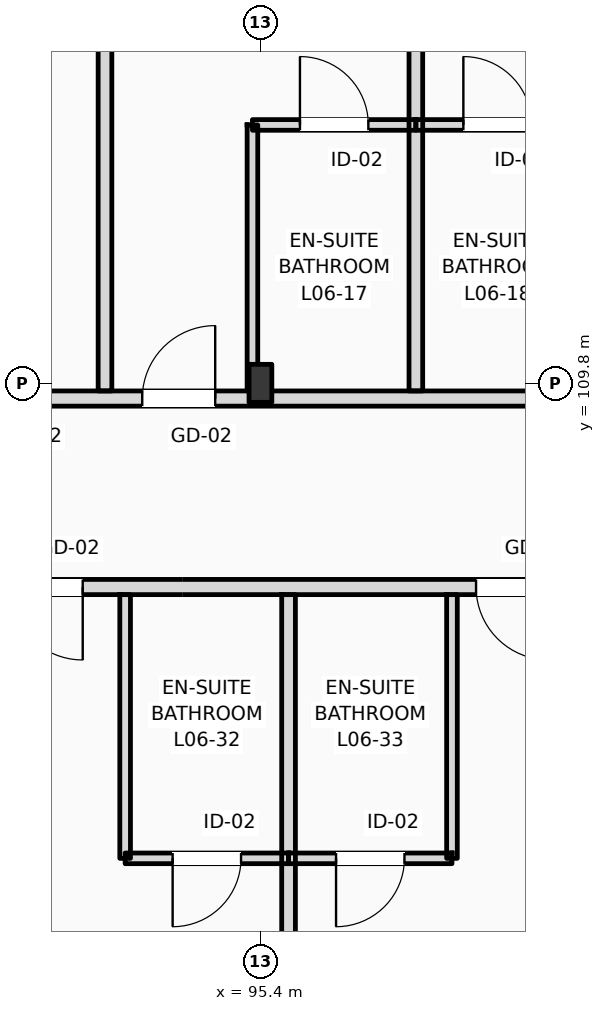
"""IFC4 building model, lengths in metres.
Left out: names, types, materials, properties, quantities, classifications, styles, units other than length and angle.
Written with IfcOpenShell. Run it as: python <this file> out.ifc"""

import sys

from ifc_helpers import new_model, si_unit, direction, frame, frame_2d, origin, origin_2d, place, context, subcontext, project, spatial, rectangle, i_section, extrude, element, fill, save


model = new_model("IFC4")
c1 = context("Model", 3, precision=1e-05, world=origin(), true_north=direction((0.0, 1.0)))
c2 = subcontext(c1, "Body", "Model", "MODEL_VIEW")
j1 = project(units=[si_unit("LENGTHUNIT", "METRE"), si_unit("PLANEANGLEUNIT", "RADIAN")], contexts=[c1])
p1 = place(None, origin())
s1 = spatial("IfcSite", under=j1, at=p1, CompositionType="ELEMENT")
p2 = place(p1, origin())
s2 = spatial("IfcBuilding", under=s1, at=p2, CompositionType="ELEMENT")
p3 = place(p2, frame((0.0, 0.0, 28.2)))
s3 = spatial("IfcBuildingStorey", under=s2, at=p3, CompositionType="ELEMENT", Elevation=28.2)
p4 = place(p3, frame((95.4, 109.8, 0.0), z_axis=(0.0, 0.0, 1.0), x_axis=(1.0, 0.0, 0.0)))
e1 = element("IfcColumn", 1, at=p4, inside=s3, PredefinedType="COLUMN", context=c2, shape_type="SweptSolid", body=[
    extrude(i_section(OverallWidth=0.3, OverallDepth=0.5, WebThickness=0.014, FlangeThickness=0.028, FilletRadius=0.027, at=origin_2d()), origin(), (0.0, 0.0, 1.0), 3.6),
])
p5 = place(p3, frame((10.65, 109.6, 0.0), z_axis=(0.0, 0.0, 1.0), x_axis=(1.0, 0.0, 0.0)))
e2 = element("IfcWall", 2, at=p5, inside=s3, PredefinedType="PARTITIONING", context=c2, shape_type="SweptSolid", body=[
    extrude(rectangle(XDim=109.21, YDim=0.2, at=frame_2d((54.605, 0.0))), origin(), (0.0, 0.0, 1.0), 2.8),
])
p6 = place(p5, frame((12.611, 0.0, 0.0)))
e3 = element("IfcOpeningElement", 3, at=p6, cuts=e2, PredefinedType="OPENING", context=c2, shape_type="SweptSolid", body=[
    extrude(rectangle(XDim=1.02, YDim=2.2, at=frame_2d((0.51, 1.1))), frame((0.0, 0.11, 0.0), z_axis=(0.0, -1.0, 0.0), x_axis=(1.0, 0.0, 0.0)), (0.0, 0.0, 1.0), 0.22),
])
p7 = place(p5, frame((19.451, 0.0, 0.0)))
e4 = element("IfcOpeningElement", 4, at=p7, cuts=e2, PredefinedType="OPENING", context=c2, shape_type="SweptSolid", body=[
    extrude(rectangle(XDim=1.02, YDim=2.2, at=frame_2d((0.51, 1.1))), frame((0.0, 0.11, 0.0), z_axis=(0.0, -1.0, 0.0), x_axis=(1.0, 0.0, 0.0)), (0.0, 0.0, 1.0), 0.22),
])
p8 = place(p5, frame((23.842, 0.0, 0.0)))
e5 = element("IfcOpeningElement", 5, at=p8, cuts=e2, PredefinedType="OPENING", context=c2, shape_type="SweptSolid", body=[
    extrude(rectangle(XDim=1.02, YDim=2.2, at=frame_2d((0.51, 1.1))), frame((0.0, 0.11, 0.0), z_axis=(0.0, -1.0, 0.0), x_axis=(1.0, 0.0, 0.0)), (0.0, 0.0, 1.0), 0.22),
])
p9 = place(p5, frame((26.084, 0.0, 0.0)))
e6 = element("IfcOpeningElement", 6, at=p9, cuts=e2, PredefinedType="OPENING", context=c2, shape_type="SweptSolid", body=[
    extrude(rectangle(XDim=1.02, YDim=2.2, at=frame_2d((0.51, 1.1))), frame((0.0, 0.11, 0.0), z_axis=(0.0, -1.0, 0.0), x_axis=(1.0, 0.0, 0.0)), (0.0, 0.0, 1.0), 0.22),
])
p10 = place(p5, frame((32.655, 0.0, 0.0)))
e7 = element("IfcOpeningElement", 7, at=p10, cuts=e2, PredefinedType="OPENING", context=c2, shape_type="SweptSolid", body=[
    extrude(rectangle(XDim=0.96, YDim=2.2, at=frame_2d((0.48, 1.1))), frame((0.0, 0.11, 0.0), z_axis=(0.0, -1.0, 0.0), x_axis=(1.0, 0.0, 0.0)), (0.0, 0.0, 1.0), 0.22),
])
p11 = place(p5, frame((34.895, 0.0, 0.0)))
e8 = element("IfcOpeningElement", 8, at=p11, cuts=e2, PredefinedType="OPENING", context=c2, shape_type="SweptSolid", body=[
    extrude(rectangle(XDim=0.96, YDim=2.2, at=frame_2d((0.48, 1.1))), frame((0.0, 0.11, 0.0), z_axis=(0.0, -1.0, 0.0), x_axis=(1.0, 0.0, 0.0)), (0.0, 0.0, 1.0), 0.22),
])
p12 = place(p5, frame((41.436, 0.0, 0.0)))
e9 = element("IfcOpeningElement", 9, at=p12, cuts=e2, PredefinedType="OPENING", context=c2, shape_type="SweptSolid", body=[
    extrude(rectangle(XDim=0.96, YDim=2.2, at=frame_2d((0.48, 1.1))), frame((0.0, 0.11, 0.0), z_axis=(0.0, -1.0, 0.0), x_axis=(1.0, 0.0, 0.0)), (0.0, 0.0, 1.0), 0.22),
])
p13 = place(p5, frame((43.427, 0.0, 0.0)))
e10 = element("IfcOpeningElement", 10, at=p13, cuts=e2, PredefinedType="OPENING", context=c2, shape_type="SweptSolid", body=[
    extrude(rectangle(XDim=0.96, YDim=2.2, at=frame_2d((0.48, 1.1))), frame((0.0, 0.11, 0.0), z_axis=(0.0, -1.0, 0.0), x_axis=(1.0, 0.0, 0.0)), (0.0, 0.0, 1.0), 0.22),
])
p14 = place(p5, frame((50.218, 0.0, 0.0)))
e11 = element("IfcOpeningElement", 11, at=p14, cuts=e2, PredefinedType="OPENING", context=c2, shape_type="SweptSolid", body=[
    extrude(rectangle(XDim=0.96, YDim=2.2, at=frame_2d((0.48, 1.1))), frame((0.0, 0.11, 0.0), z_axis=(0.0, -1.0, 0.0), x_axis=(1.0, 0.0, 0.0)), (0.0, 0.0, 1.0), 0.22),
])
p15 = place(p5, frame((54.859, 0.0, 0.0)))
e12 = element("IfcOpeningElement", 12, at=p15, cuts=e2, PredefinedType="OPENING", context=c2, shape_type="SweptSolid", body=[
    extrude(rectangle(XDim=0.96, YDim=2.2, at=frame_2d((0.48, 1.1))), frame((0.0, 0.11, 0.0), z_axis=(0.0, -1.0, 0.0), x_axis=(1.0, 0.0, 0.0)), (0.0, 0.0, 1.0), 0.22),
])
p16 = place(p5, frame((59.0, 0.0, 0.0)))
e13 = element("IfcOpeningElement", 13, at=p16, cuts=e2, PredefinedType="OPENING", context=c2, shape_type="SweptSolid", body=[
    extrude(rectangle(XDim=0.96, YDim=2.2, at=frame_2d((0.48, 1.1))), frame((0.0, 0.11, 0.0), z_axis=(0.0, -1.0, 0.0), x_axis=(1.0, 0.0, 0.0)), (0.0, 0.0, 1.0), 0.22),
])
p17 = place(p5, frame((63.39, 0.0, 0.0)))
e14 = element("IfcOpeningElement", 14, at=p17, cuts=e2, PredefinedType="OPENING", context=c2, shape_type="SweptSolid", body=[
    extrude(rectangle(XDim=0.96, YDim=2.2, at=frame_2d((0.48, 1.1))), frame((0.0, 0.11, 0.0), z_axis=(0.0, -1.0, 0.0), x_axis=(1.0, 0.0, 0.0)), (0.0, 0.0, 1.0), 0.22),
])
p18 = place(p5, frame((65.631, 0.0, 0.0)))
e15 = element("IfcOpeningElement", 15, at=p18, cuts=e2, PredefinedType="OPENING", context=c2, shape_type="SweptSolid", body=[
    extrude(rectangle(XDim=0.96, YDim=2.2, at=frame_2d((0.48, 1.1))), frame((0.0, 0.11, 0.0), z_axis=(0.0, -1.0, 0.0), x_axis=(1.0, 0.0, 0.0)), (0.0, 0.0, 1.0), 0.22),
])
p19 = place(p5, frame((72.172, 0.0, 0.0)))
e16 = element("IfcOpeningElement", 16, at=p19, cuts=e2, PredefinedType="OPENING", context=c2, shape_type="SweptSolid", body=[
    extrude(rectangle(XDim=0.96, YDim=2.2, at=frame_2d((0.48, 1.1))), frame((0.0, 0.11, 0.0), z_axis=(0.0, -1.0, 0.0), x_axis=(1.0, 0.0, 0.0)), (0.0, 0.0, 1.0), 0.22),
])
p20 = place(p5, frame((74.413, 0.0, 0.0)))
e17 = element("IfcOpeningElement", 17, at=p20, cuts=e2, PredefinedType="OPENING", context=c2, shape_type="SweptSolid", body=[
    extrude(rectangle(XDim=0.96, YDim=2.2, at=frame_2d((0.48, 1.1))), frame((0.0, 0.11, 0.0), z_axis=(0.0, -1.0, 0.0), x_axis=(1.0, 0.0, 0.0)), (0.0, 0.0, 1.0), 0.22),
])
p21 = place(p5, frame((80.954, 0.0, 0.0)))
e18 = element("IfcOpeningElement", 18, at=p21, cuts=e2, PredefinedType="OPENING", context=c2, shape_type="SweptSolid", body=[
    extrude(rectangle(XDim=0.96, YDim=2.2, at=frame_2d((0.48, 1.1))), frame((0.0, 0.11, 0.0), z_axis=(0.0, -1.0, 0.0), x_axis=(1.0, 0.0, 0.0)), (0.0, 0.0, 1.0), 0.22),
])
p22 = place(p5, frame((83.195, 0.0, 0.0)))
e19 = element("IfcOpeningElement", 19, at=p22, cuts=e2, PredefinedType="OPENING", context=c2, shape_type="SweptSolid", body=[
    extrude(rectangle(XDim=0.96, YDim=2.2, at=frame_2d((0.48, 1.1))), frame((0.0, 0.11, 0.0), z_axis=(0.0, -1.0, 0.0), x_axis=(1.0, 0.0, 0.0)), (0.0, 0.0, 1.0), 0.22),
])
p23 = place(p5, frame((89.735, 0.0, 0.0)))
e20 = element("IfcOpeningElement", 20, at=p23, cuts=e2, PredefinedType="OPENING", context=c2, shape_type="SweptSolid", body=[
    extrude(rectangle(XDim=0.96, YDim=2.2, at=frame_2d((0.48, 1.1))), frame((0.0, 0.11, 0.0), z_axis=(0.0, -1.0, 0.0), x_axis=(1.0, 0.0, 0.0)), (0.0, 0.0, 1.0), 0.22),
])
p24 = place(p5, frame((94.126, 0.0, 0.0)))
e21 = element("IfcOpeningElement", 21, at=p24, cuts=e2, PredefinedType="OPENING", context=c2, shape_type="SweptSolid", body=[
    extrude(rectangle(XDim=0.96, YDim=2.2, at=frame_2d((0.48, 1.1))), frame((0.0, 0.11, 0.0), z_axis=(0.0, -1.0, 0.0), x_axis=(1.0, 0.0, 0.0)), (0.0, 0.0, 1.0), 0.22),
])
p25 = place(p5, frame((98.517, 0.0, 0.0)))
e22 = element("IfcOpeningElement", 22, at=p25, cuts=e2, PredefinedType="OPENING", context=c2, shape_type="SweptSolid", body=[
    extrude(rectangle(XDim=0.96, YDim=2.2, at=frame_2d((0.48, 1.1))), frame((0.0, 0.11, 0.0), z_axis=(0.0, -1.0, 0.0), x_axis=(1.0, 0.0, 0.0)), (0.0, 0.0, 1.0), 0.22),
])
p26 = place(p5, frame((102.908, 0.0, 0.0)))
e23 = element("IfcOpeningElement", 23, at=p26, cuts=e2, PredefinedType="OPENING", context=c2, shape_type="SweptSolid", body=[
    extrude(rectangle(XDim=0.96, YDim=2.2, at=frame_2d((0.48, 1.1))), frame((0.0, 0.11, 0.0), z_axis=(0.0, -1.0, 0.0), x_axis=(1.0, 0.0, 0.0)), (0.0, 0.0, 1.0), 0.22),
])
p27 = place(p5, frame((105.099, 0.0, 0.0)))
e24 = element("IfcOpeningElement", 24, at=p27, cuts=e2, PredefinedType="OPENING", context=c2, shape_type="SweptSolid", body=[
    extrude(rectangle(XDim=0.96, YDim=2.2, at=frame_2d((0.48, 1.1))), frame((0.0, 0.11, 0.0), z_axis=(0.0, -1.0, 0.0), x_axis=(1.0, 0.0, 0.0)), (0.0, 0.0, 1.0), 0.22),
])
p28 = place(p5, frame((2.716, 0.0, 0.0)))
e25 = element("IfcOpeningElement", 25, at=p28, cuts=e2, PredefinedType="OPENING", context=c2, shape_type="SweptSolid", body=[
    extrude(rectangle(XDim=1.35, YDim=2.25, at=frame_2d((0.675, 1.125))), frame((0.0, 0.11, 0.0), z_axis=(0.0, -1.0, 0.0), x_axis=(1.0, 0.0, 0.0)), (0.0, 0.0, 1.0), 0.22),
])
p29 = place(p5, frame((6.65, 0.0, 0.0)))
e26 = element("IfcOpeningElement", 26, at=p29, cuts=e2, PredefinedType="OPENING", context=c2, shape_type="SweptSolid", body=[
    extrude(rectangle(XDim=1.35, YDim=2.25, at=frame_2d((0.675, 1.125))), frame((0.0, 0.11, 0.0), z_axis=(0.0, -1.0, 0.0), x_axis=(1.0, 0.0, 0.0)), (0.0, 0.0, 1.0), 0.22),
])
p30 = place(p5, frame((10.583, 0.0, 0.0)))
e27 = element("IfcOpeningElement", 27, at=p30, cuts=e2, PredefinedType="OPENING", context=c2, shape_type="SweptSolid", body=[
    extrude(rectangle(XDim=1.35, YDim=2.25, at=frame_2d((0.675, 1.125))), frame((0.0, 0.11, 0.0), z_axis=(0.0, -1.0, 0.0), x_axis=(1.0, 0.0, 0.0)), (0.0, 0.0, 1.0), 0.22),
])
p31 = place(p3, frame((79.76, 107.12, 0.0), z_axis=(0.0, 0.0, 1.0), x_axis=(1.0, 0.0, 0.0)))
e28 = element("IfcWall", 28, at=p31, inside=s3, PredefinedType="PARTITIONING", context=c2, shape_type="SweptSolid", body=[
    extrude(rectangle(XDim=40.1, YDim=0.2, at=frame_2d((20.05, 0.0))), origin(), (0.0, 0.0, 1.0), 3.36),
])
p32 = place(p31, frame((2.497, 0.0, 0.0)))
e29 = element("IfcOpeningElement", 29, at=p32, cuts=e28, PredefinedType="OPENING", context=c2, shape_type="SweptSolid", body=[
    extrude(rectangle(XDim=0.96, YDim=2.2, at=frame_2d((0.48, 1.1))), frame((0.0, 0.11, 0.0), z_axis=(0.0, -1.0, 0.0), x_axis=(1.0, 0.0, 0.0)), (0.0, 0.0, 1.0), 0.22),
])
p33 = place(p31, frame((4.372, 0.0, 0.0)))
e30 = element("IfcOpeningElement", 30, at=p33, cuts=e28, PredefinedType="OPENING", context=c2, shape_type="SweptSolid", body=[
    extrude(rectangle(XDim=0.96, YDim=2.2, at=frame_2d((0.48, 1.1))), frame((0.0, 0.11, 0.0), z_axis=(0.0, -1.0, 0.0), x_axis=(1.0, 0.0, 0.0)), (0.0, 0.0, 1.0), 0.22),
])
p34 = place(p31, frame((10.507, 0.0, 0.0)))
e31 = element("IfcOpeningElement", 31, at=p34, cuts=e28, PredefinedType="OPENING", context=c2, shape_type="SweptSolid", body=[
    extrude(rectangle(XDim=0.96, YDim=2.2, at=frame_2d((0.48, 1.1))), frame((0.0, 0.11, 0.0), z_axis=(0.0, -1.0, 0.0), x_axis=(1.0, 0.0, 0.0)), (0.0, 0.0, 1.0), 0.22),
])
p35 = place(p31, frame((12.342, 0.0, 0.0)))
e32 = element("IfcOpeningElement", 32, at=p35, cuts=e28, PredefinedType="OPENING", context=c2, shape_type="SweptSolid", body=[
    extrude(rectangle(XDim=0.96, YDim=2.2, at=frame_2d((0.48, 1.1))), frame((0.0, 0.11, 0.0), z_axis=(0.0, -1.0, 0.0), x_axis=(1.0, 0.0, 0.0)), (0.0, 0.0, 1.0), 0.22),
])
p36 = place(p31, frame((18.477, 0.0, 0.0)))
e33 = element("IfcOpeningElement", 33, at=p36, cuts=e28, PredefinedType="OPENING", context=c2, shape_type="SweptSolid", body=[
    extrude(rectangle(XDim=0.96, YDim=2.2, at=frame_2d((0.48, 1.1))), frame((0.0, 0.11, 0.0), z_axis=(0.0, -1.0, 0.0), x_axis=(1.0, 0.0, 0.0)), (0.0, 0.0, 1.0), 0.22),
])
p37 = place(p31, frame((20.312, 0.0, 0.0)))
e34 = element("IfcOpeningElement", 34, at=p37, cuts=e28, PredefinedType="OPENING", context=c2, shape_type="SweptSolid", body=[
    extrude(rectangle(XDim=0.96, YDim=2.2, at=frame_2d((0.48, 1.1))), frame((0.0, 0.11, 0.0), z_axis=(0.0, -1.0, 0.0), x_axis=(1.0, 0.0, 0.0)), (0.0, 0.0, 1.0), 0.22),
])
p38 = place(p31, frame((26.447, 0.0, 0.0)))
e35 = element("IfcOpeningElement", 35, at=p38, cuts=e28, PredefinedType="OPENING", context=c2, shape_type="SweptSolid", body=[
    extrude(rectangle(XDim=0.96, YDim=2.2, at=frame_2d((0.48, 1.1))), frame((0.0, 0.11, 0.0), z_axis=(0.0, -1.0, 0.0), x_axis=(1.0, 0.0, 0.0)), (0.0, 0.0, 1.0), 0.22),
])
p39 = place(p31, frame((28.282, 0.0, 0.0)))
e36 = element("IfcOpeningElement", 36, at=p39, cuts=e28, PredefinedType="OPENING", context=c2, shape_type="SweptSolid", body=[
    extrude(rectangle(XDim=0.96, YDim=2.2, at=frame_2d((0.48, 1.1))), frame((0.0, 0.11, 0.0), z_axis=(0.0, -1.0, 0.0), x_axis=(1.0, 0.0, 0.0)), (0.0, 0.0, 1.0), 0.22),
])
p40 = place(p31, frame((34.417, 0.0, 0.0)))
e37 = element("IfcOpeningElement", 37, at=p40, cuts=e28, PredefinedType="OPENING", context=c2, shape_type="SweptSolid", body=[
    extrude(rectangle(XDim=0.96, YDim=2.2, at=frame_2d((0.48, 1.1))), frame((0.0, 0.11, 0.0), z_axis=(0.0, -1.0, 0.0), x_axis=(1.0, 0.0, 0.0)), (0.0, 0.0, 1.0), 0.22),
])
p41 = place(p31, frame((36.212, 0.0, 0.0)))
e38 = element("IfcOpeningElement", 38, at=p41, cuts=e28, PredefinedType="OPENING", context=c2, shape_type="SweptSolid", body=[
    extrude(rectangle(XDim=0.96, YDim=2.2, at=frame_2d((0.48, 1.1))), frame((0.0, 0.11, 0.0), z_axis=(0.0, -1.0, 0.0), x_axis=(1.0, 0.0, 0.0)), (0.0, 0.0, 1.0), 0.22),
])
for number, where, z_axis, x_axis in (
    (39, (93.355, 109.7, 0.0), (0.0, 0.0, 1.0), (0.0, 1.0, 0.0)),
    (40, (97.445, 109.7, 0.0), (0.0, 0.0, 1.0), (0.0, 1.0, 0.0)),
):
    element("IfcWall", number, at=place(p3, frame(where, z_axis=z_axis, x_axis=x_axis)), inside=s3, PredefinedType="PARTITIONING", context=c2, shape_type="SweptSolid", body=[
        extrude(rectangle(XDim=8.15, YDim=0.18, at=frame_2d((4.075, 0.0))), origin(), (0.0, 0.0, 1.0), 3.36),
    ])
p42 = place(p3, frame((95.295, 109.7, 0.0), z_axis=(0.0, 0.0, 1.0), x_axis=(0.0, 1.0, 0.0)))
e41 = element("IfcWall", 41, at=p42, inside=s3, PredefinedType="PARTITIONING", context=c2, shape_type="SweptSolid", body=[
    extrude(rectangle(XDim=3.5, YDim=0.14, at=frame_2d((1.75, 0.0))), origin(), (0.0, 0.0, 1.0), 2.99),
])
p43 = place(p3, frame((95.295, 113.2, 0.0), z_axis=(0.0, 0.0, 1.0), x_axis=(1.0, 0.0, 0.0)))
e42 = element("IfcWall", 42, at=p43, inside=s3, PredefinedType="PARTITIONING", context=c2, shape_type="SweptSolid", body=[
    extrude(rectangle(XDim=2.15, YDim=0.14, at=frame_2d((1.075, 0.0))), origin(), (0.0, 0.0, 1.0), 3.36),
])
p44 = place(p43, frame((0.625, 0.0, 0.0)))
e43 = element("IfcOpeningElement", 43, at=p44, cuts=e42, PredefinedType="OPENING", context=c2, shape_type="SweptSolid", body=[
    extrude(rectangle(XDim=0.9, YDim=2.1, at=frame_2d((0.45, 1.05))), frame((0.0, 0.08, 0.0), z_axis=(0.0, -1.0, 0.0), x_axis=(1.0, 0.0, 0.0)), (0.0, 0.0, 1.0), 0.16),
])
p45 = place(p3, frame((97.445, 113.2, 0.0), z_axis=(0.0, 0.0, 1.0), x_axis=(1.0, 0.0, 0.0)))
e44 = element("IfcWall", 44, at=p45, inside=s3, PredefinedType="PARTITIONING", context=c2, shape_type="SweptSolid", body=[
    extrude(rectangle(XDim=2.15, YDim=0.14, at=frame_2d((1.075, 0.0))), origin(), (0.0, 0.0, 1.0), 3.36),
])
p46 = place(p45, frame((0.625, 0.0, 0.0)))
e45 = element("IfcOpeningElement", 45, at=p46, cuts=e44, PredefinedType="OPENING", context=c2, shape_type="SweptSolid", body=[
    extrude(rectangle(XDim=0.9, YDim=2.1, at=frame_2d((0.45, 1.05))), frame((0.0, 0.08, 0.0), z_axis=(0.0, -1.0, 0.0), x_axis=(1.0, 0.0, 0.0)), (0.0, 0.0, 1.0), 0.16),
])
p47 = place(p3, frame((95.77, 96.14, 0.0), z_axis=(0.0, 0.0, 1.0), x_axis=(0.0, 1.0, 0.0)))
e46 = element("IfcWall", 46, at=p47, inside=s3, PredefinedType="PARTITIONING", context=c2, shape_type="SweptSolid", body=[
    extrude(rectangle(XDim=10.88, YDim=0.18, at=frame_2d((5.44, 0.0))), origin(), (0.0, 0.0, 1.0), 3.36),
])
p48 = place(p3, frame((93.62, 103.55, 0.0), z_axis=(0.0, 0.0, 1.0), x_axis=(0.0, 1.0, 0.0)))
e47 = element("IfcWall", 47, at=p48, inside=s3, PredefinedType="PARTITIONING", context=c2, shape_type="SweptSolid", body=[
    extrude(rectangle(XDim=3.47, YDim=0.14, at=frame_2d((1.735, 0.0))), origin(), (0.0, 0.0, 1.0), 3.36),
])
p49 = place(p3, frame((93.62, 103.55, 0.0), z_axis=(0.0, 0.0, 1.0), x_axis=(1.0, 0.0, 0.0)))
e48 = element("IfcWall", 48, at=p49, inside=s3, PredefinedType="PARTITIONING", context=c2, shape_type="SweptSolid", body=[
    extrude(rectangle(XDim=2.15, YDim=0.14, at=frame_2d((1.075, 0.0))), origin(), (0.0, 0.0, 1.0), 3.36),
])
p50 = place(p49, frame((0.625, 0.0, 0.0)))
e49 = element("IfcOpeningElement", 49, at=p50, cuts=e48, PredefinedType="OPENING", context=c2, shape_type="SweptSolid", body=[
    extrude(rectangle(XDim=0.9, YDim=2.1, at=frame_2d((0.45, 1.05))), frame((0.0, 0.08, 0.0), z_axis=(0.0, -1.0, 0.0), x_axis=(1.0, 0.0, 0.0)), (0.0, 0.0, 1.0), 0.16),
])
p51 = place(p3, frame((97.92, 103.55, 0.0), z_axis=(0.0, 0.0, 1.0), x_axis=(0.0, 1.0, 0.0)))
e50 = element("IfcWall", 50, at=p51, inside=s3, PredefinedType="PARTITIONING", context=c2, shape_type="SweptSolid", body=[
    extrude(rectangle(XDim=3.47, YDim=0.14, at=frame_2d((1.735, 0.0))), origin(), (0.0, 0.0, 1.0), 3.05),
])
p52 = place(p3, frame((95.77, 103.55, 0.0), z_axis=(0.0, 0.0, 1.0), x_axis=(1.0, 0.0, 0.0)))
e51 = element("IfcWall", 51, at=p52, inside=s3, PredefinedType="PARTITIONING", context=c2, shape_type="SweptSolid", body=[
    extrude(rectangle(XDim=2.15, YDim=0.14, at=frame_2d((1.075, 0.0))), origin(), (0.0, 0.0, 1.0), 3.36),
])
p53 = place(p52, frame((0.625, 0.0, 0.0)))
e52 = element("IfcOpeningElement", 52, at=p53, cuts=e51, PredefinedType="OPENING", context=c2, shape_type="SweptSolid", body=[
    extrude(rectangle(XDim=0.9, YDim=2.1, at=frame_2d((0.45, 1.05))), frame((0.0, 0.08, 0.0), z_axis=(0.0, -1.0, 0.0), x_axis=(1.0, 0.0, 0.0)), (0.0, 0.0, 1.0), 0.16),
])
p54 = place(p22, origin())
e53 = element("IfcDoor", 53, at=p54, inside=s3, OperationType="SINGLE_SWING_RIGHT", PredefinedType="DOOR", context=c2, shape_type="SweptSolid", body=[
    extrude(rectangle(XDim=0.96, YDim=2.2, at=frame_2d((0.48, 1.1))), frame((0.0, 0.025, 0.0), z_axis=(0.0, -1.0, 0.0), x_axis=(1.0, 0.0, 0.0)), (0.0, 0.0, 1.0), 0.05),
])
fill(e19, e53)
p55 = place(p44, origin())
e54 = element("IfcDoor", 54, at=p55, inside=s3, OperationType="SINGLE_SWING_LEFT", PredefinedType="DOOR", context=c2, shape_type="SweptSolid", body=[
    extrude(rectangle(XDim=0.9, YDim=2.1, at=frame_2d((0.45, 1.05))), frame((0.0, 0.025, 0.0), z_axis=(0.0, -1.0, 0.0), x_axis=(1.0, 0.0, 0.0)), (0.0, 0.0, 1.0), 0.05),
])
fill(e43, e54)
p56 = place(p46, origin())
e55 = element("IfcDoor", 55, at=p56, inside=s3, OperationType="SINGLE_SWING_LEFT", PredefinedType="DOOR", context=c2, shape_type="SweptSolid", body=[
    extrude(rectangle(XDim=0.9, YDim=2.1, at=frame_2d((0.45, 1.05))), frame((0.0, 0.025, 0.0), z_axis=(0.0, -1.0, 0.0), x_axis=(1.0, 0.0, 0.0)), (0.0, 0.0, 1.0), 0.05),
])
fill(e45, e55)
p57 = place(p35, frame((0.96, 0.0, 0.0), z_axis=(0.0, 0.0, 1.0), x_axis=(-1.0, 0.0, 0.0)))
e56 = element("IfcDoor", 56, at=p57, inside=s3, OperationType="SINGLE_SWING_RIGHT", PredefinedType="DOOR", context=c2, shape_type="SweptSolid", body=[
    extrude(rectangle(XDim=0.96, YDim=2.2, at=frame_2d((0.48, 1.1))), frame((0.0, 0.025, 0.0), z_axis=(0.0, -1.0, 0.0), x_axis=(1.0, 0.0, 0.0)), (0.0, 0.0, 1.0), 0.05),
])
fill(e32, e56)
p58 = place(p50, frame((0.9, 0.0, 0.0), z_axis=(0.0, 0.0, 1.0), x_axis=(-1.0, 0.0, 0.0)))
e57 = element("IfcDoor", 57, at=p58, inside=s3, OperationType="SINGLE_SWING_LEFT", PredefinedType="DOOR", context=c2, shape_type="SweptSolid", body=[
    extrude(rectangle(XDim=0.9, YDim=2.1, at=frame_2d((0.45, 1.05))), frame((0.0, 0.025, 0.0), z_axis=(0.0, -1.0, 0.0), x_axis=(1.0, 0.0, 0.0)), (0.0, 0.0, 1.0), 0.05),
])
fill(e49, e57)
p59 = place(p36, frame((0.96, 0.0, 0.0), z_axis=(0.0, 0.0, 1.0), x_axis=(-1.0, 0.0, 0.0)))
e58 = element("IfcDoor", 58, at=p59, inside=s3, OperationType="SINGLE_SWING_RIGHT", PredefinedType="DOOR", context=c2, shape_type="SweptSolid", body=[
    extrude(rectangle(XDim=0.96, YDim=2.2, at=frame_2d((0.48, 1.1))), frame((0.0, 0.025, 0.0), z_axis=(0.0, -1.0, 0.0), x_axis=(1.0, 0.0, 0.0)), (0.0, 0.0, 1.0), 0.05),
])
fill(e33, e58)
p60 = place(p53, frame((0.9, 0.0, 0.0), z_axis=(0.0, 0.0, 1.0), x_axis=(-1.0, 0.0, 0.0)))
e59 = element("IfcDoor", 59, at=p60, inside=s3, OperationType="SINGLE_SWING_LEFT", PredefinedType="DOOR", context=c2, shape_type="SweptSolid", body=[
    extrude(rectangle(XDim=0.9, YDim=2.1, at=frame_2d((0.45, 1.05))), frame((0.0, 0.025, 0.0), z_axis=(0.0, -1.0, 0.0), x_axis=(1.0, 0.0, 0.0)), (0.0, 0.0, 1.0), 0.05),
])
fill(e52, e59)
save(model, sys.argv[1])
